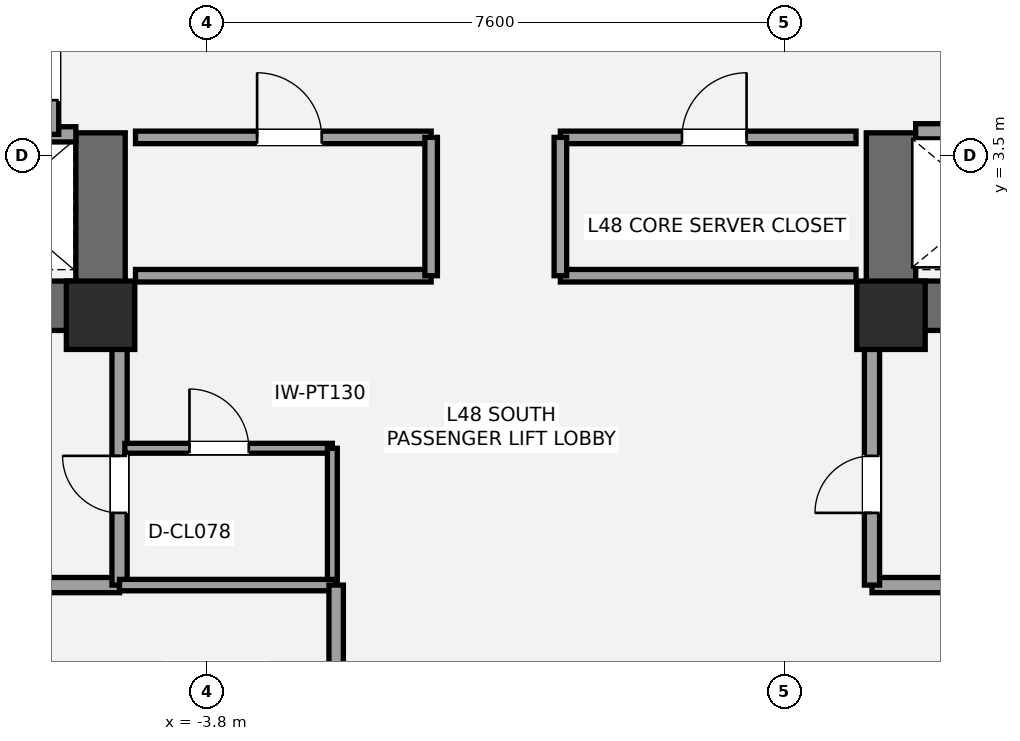
"""IFC4 building model, lengths in metres.
Left out: names, types, materials, properties, quantities, classifications, styles, units other than length and angle.
Written with IfcOpenShell. Run it as: python <this file> out.ifc"""

import sys

from ifc_helpers import new_model, si_unit, direction, frame, frame_2d, origin, origin_2d, place, context, subcontext, project, spatial, rectangle, extrude, element, fill, save


model = new_model("IFC4")
c1 = context("Model", 3, precision=1e-05, world=origin(), true_north=direction((0.0, 1.0)))
c2 = subcontext(c1, "Body", "Model", "MODEL_VIEW")
j1 = project(units=[si_unit("LENGTHUNIT", "METRE"), si_unit("PLANEANGLEUNIT", "RADIAN")], contexts=[c1])
p1 = place(None, origin())
s1 = spatial("IfcSite", under=j1, at=p1, CompositionType="ELEMENT")
p2 = place(p1, origin())
s2 = spatial("IfcBuilding", under=s1, at=p2, CompositionType="ELEMENT")
p3 = place(p2, frame((0.0, 0.0, 175.8)))
s3 = spatial("IfcBuildingStorey", under=s2, at=p3, CompositionType="ELEMENT", Elevation=175.8)
p4 = place(p3, frame((-4.875, 1.525, 0.0), z_axis=(0.0, 0.0, 1.0), x_axis=(-1.0, 0.0, 0.0)))
e1 = element("IfcWall", 1, at=p4, inside=s3, PredefinedType="SHEAR", context=c2, shape_type="SweptSolid", body=[
    extrude(rectangle(XDim=8.925, YDim=0.65, at=frame_2d((4.462, 0.0))), origin(), (0.0, 0.0, 1.0), 3.2),
])
p5 = place(p4, frame((5.425, 0.0, 0.0)))
e2 = element("IfcOpeningElement", 2, at=p5, cuts=e1, PredefinedType="OPENING", context=c2, shape_type="SweptSolid", body=[
    extrude(rectangle(XDim=1.05, YDim=2.15, at=frame_2d((0.525, 1.075))), frame((0.0, 0.335, 0.0), z_axis=(0.0, -1.0, 0.0), x_axis=(1.0, 0.0, 0.0)), (0.0, 0.0, 1.0), 0.67),
])
p6 = place(p4, frame((3.755, 0.0, 0.0)))
e3 = element("IfcOpeningElement", 3, at=p6, cuts=e1, PredefinedType="OPENING", context=c2, shape_type="SweptSolid", body=[
    extrude(rectangle(XDim=1.1, YDim=2.2, at=frame_2d((0.55, 1.1))), frame((0.0, 0.335, 0.0), z_axis=(0.0, -1.0, 0.0), x_axis=(1.0, 0.0, 0.0)), (0.0, 0.0, 1.0), 0.67),
])
p7 = place(p3, frame((-5.2, 1.2, 0.0), z_axis=(0.0, 0.0, 1.0), x_axis=(0.0, 1.0, 0.0)))
e4 = element("IfcWall", 4, at=p7, inside=s3, PredefinedType="SHEAR", context=c2, shape_type="SweptSolid", body=[
    extrude(rectangle(XDim=2.6, YDim=0.65, at=frame_2d((1.3, 0.0))), origin(), (0.0, 0.0, 1.0), 3.2),
])
p8 = place(p3, frame((13.8, 1.525, 0.0), z_axis=(0.0, 0.0, 1.0), x_axis=(-1.0, 0.0, 0.0)))
e5 = element("IfcWall", 5, at=p8, inside=s3, PredefinedType="SHEAR", context=c2, shape_type="SweptSolid", body=[
    extrude(rectangle(XDim=8.925, YDim=0.65, at=frame_2d((4.462, 0.0))), origin(), (0.0, 0.0, 1.0), 3.2),
])
p9 = place(p8, frame((2.45, 0.0, 0.0)))
e6 = element("IfcOpeningElement", 6, at=p9, cuts=e5, PredefinedType="OPENING", context=c2, shape_type="SweptSolid", body=[
    extrude(rectangle(XDim=1.05, YDim=2.15, at=frame_2d((0.525, 1.075))), frame((0.0, 0.335, 0.0), z_axis=(0.0, -1.0, 0.0), x_axis=(1.0, 0.0, 0.0)), (0.0, 0.0, 1.0), 0.67),
])
p10 = place(p8, frame((4.45, 0.0, 0.0)))
e7 = element("IfcOpeningElement", 7, at=p10, cuts=e5, PredefinedType="OPENING", context=c2, shape_type="SweptSolid", body=[
    extrude(rectangle(XDim=1.1, YDim=2.2, at=frame_2d((0.55, 1.1))), frame((0.0, 0.335, 0.0), z_axis=(0.0, -1.0, 0.0), x_axis=(1.0, 0.0, 0.0)), (0.0, 0.0, 1.0), 0.67),
])
p11 = place(p3, frame((5.2, 1.2, 0.0), z_axis=(0.0, 0.0, 1.0), x_axis=(0.0, 1.0, 0.0)))
e8 = element("IfcWall", 8, at=p11, inside=s3, PredefinedType="SHEAR", context=c2, shape_type="SweptSolid", body=[
    extrude(rectangle(XDim=2.6, YDim=0.65, at=frame_2d((1.3, 0.0))), origin(), (0.0, 0.0, 1.0), 3.2),
])
for number, where, z_axis, x_axis in (
    (9, (-5.2, 1.4, 0.0), (0.0, 0.0, 1.0), (1.0, 0.0, 0.0)),
    (10, (5.2, 1.4, 0.0), (0.0, 0.0, 1.0), (1.0, 0.0, 0.0)),
):
    element("IfcColumn", number, at=place(p3, frame(where, z_axis=z_axis, x_axis=x_axis)), inside=s3, PredefinedType="COLUMN", context=c2, shape_type="SweptSolid", body=[
        extrude(rectangle(XDim=0.9, YDim=0.9, at=origin_2d()), origin(), (0.0, 0.0, 1.0), 3.2),
    ])
p12 = place(p3, frame((-7.2, -2.15, 0.0), z_axis=(0.0, 0.0, 1.0), x_axis=(1.0, 0.0, 0.0)))
e11 = element("IfcWall", 11, at=p12, inside=s3, PredefinedType="SOLIDWALL", context=c2, shape_type="SweptSolid", body=[
    extrude(rectangle(XDim=2.25, YDim=0.2, at=frame_2d((1.125, 0.0))), origin(), (0.0, 0.0, 1.0), 3.02),
])
p13 = place(p3, frame((-4.95, -2.15, 0.0), z_axis=(0.0, 0.0, 1.0), x_axis=(0.0, 1.0, 0.0)))
e12 = element("IfcWall", 12, at=p13, inside=s3, PredefinedType="SOLIDWALL", context=c2, shape_type="SweptSolid", body=[
    extrude(rectangle(XDim=3.4, YDim=0.2, at=frame_2d((1.7, 0.0))), origin(), (0.0, 0.0, 1.0), 2.473),
])
p14 = place(p13, frame((0.95, 0.0, 0.0)))
e13 = element("IfcOpeningElement", 13, at=p14, cuts=e12, PredefinedType="OPENING", context=c2, shape_type="SweptSolid", body=[
    extrude(rectangle(XDim=0.75, YDim=2.1, at=frame_2d((0.375, 1.05))), frame((0.0, 0.11, 0.0), z_axis=(0.0, -1.0, 0.0), x_axis=(1.0, 0.0, 0.0)), (0.0, 0.0, 1.0), 0.22),
])
p15 = place(p3, frame((4.95, -2.15, 0.0), z_axis=(0.0, 0.0, 1.0), x_axis=(1.0, 0.0, 0.0)))
e14 = element("IfcWall", 14, at=p15, inside=s3, PredefinedType="SOLIDWALL", context=c2, shape_type="SweptSolid", body=[
    extrude(rectangle(XDim=2.25, YDim=0.2, at=frame_2d((1.125, 0.0))), origin(), (0.0, 0.0, 1.0), 3.02),
])
p16 = place(p3, frame((4.95, -2.15, 0.0), z_axis=(0.0, 0.0, 1.0), x_axis=(0.0, 1.0, 0.0)))
e15 = element("IfcWall", 15, at=p16, inside=s3, PredefinedType="SOLIDWALL", context=c2, shape_type="SweptSolid", body=[
    extrude(rectangle(XDim=3.4, YDim=0.2, at=frame_2d((1.7, 0.0))), origin(), (0.0, 0.0, 1.0), 2.473),
])
p17 = place(p16, frame((0.95, 0.0, 0.0)))
e16 = element("IfcOpeningElement", 16, at=p17, cuts=e15, PredefinedType="OPENING", context=c2, shape_type="SweptSolid", body=[
    extrude(rectangle(XDim=0.75, YDim=2.1, at=frame_2d((0.375, 1.05))), frame((0.0, 0.11, 0.0), z_axis=(0.0, -1.0, 0.0), x_axis=(1.0, 0.0, 0.0)), (0.0, 0.0, 1.0), 0.22),
])
p18 = place(p3, frame((-4.88, -0.35, 0.0), z_axis=(0.0, 0.0, 1.0), x_axis=(1.0, 0.0, 0.0)))
e17 = element("IfcWall", 17, at=p18, inside=s3, PredefinedType="PARTITIONING", context=c2, shape_type="SweptSolid", body=[
    extrude(rectangle(XDim=2.73, YDim=0.13, at=frame_2d((1.365, 0.0))), origin(), (0.0, 0.0, 1.0), 3.02),
])
p19 = place(p18, frame((0.85, 0.0, 0.0)))
e18 = element("IfcOpeningElement", 18, at=p19, cuts=e17, PredefinedType="OPENING", context=c2, shape_type="SweptSolid", body=[
    extrude(rectangle(XDim=0.78, YDim=2.1, at=frame_2d((0.39, 1.05))), frame((0.0, 0.075, 0.0), z_axis=(0.0, -1.0, 0.0), x_axis=(1.0, 0.0, 0.0)), (0.0, 0.0, 1.0), 0.15),
])
p20 = place(p3, frame((-2.15, -2.15, 0.0), z_axis=(0.0, 0.0, 1.0), x_axis=(0.0, 1.0, 0.0)))
e19 = element("IfcWall", 19, at=p20, inside=s3, PredefinedType="PARTITIONING", context=c2, shape_type="SweptSolid", body=[
    extrude(rectangle(XDim=1.8, YDim=0.13, at=frame_2d((0.9, 0.0))), origin(), (0.0, 0.0, 1.0), 3.02),
])
p21 = place(p3, frame((-9.78, 3.78, 0.0), z_axis=(0.0, 0.0, 1.0), x_axis=(1.0, 0.0, 0.0)))
e20 = element("IfcWall", 20, at=p21, inside=s3, PredefinedType="SOLIDWALL", context=c2, shape_type="SweptSolid", body=[
    extrude(rectangle(XDim=4.255, YDim=0.2, at=frame_2d((2.127, 0.0))), origin(), (0.0, 0.0, 1.0), 3.02),
])
p22 = place(p3, frame((-5.85, 3.78, 0.0), z_axis=(0.0, 0.0, 1.0), x_axis=(0.0, 1.0, 0.0)))
e21 = element("IfcWall", 21, at=p22, inside=s3, PredefinedType="SOLIDWALL", context=c2, shape_type="SweptSolid", body=[
    extrude(rectangle(XDim=1.69, YDim=0.2, at=frame_2d((0.845, 0.0))), origin(), (0.0, 0.0, 1.0), 3.02),
])
p23 = place(p22, frame((0.45, 0.0, 0.0)))
e22 = element("IfcOpeningElement", 22, at=p23, cuts=e21, PredefinedType="OPENING", context=c2, shape_type="SweptSolid", body=[
    extrude(rectangle(XDim=0.75, YDim=2.1, at=frame_2d((0.375, 1.05))), frame((0.0, 0.11, 0.0), z_axis=(0.0, -1.0, 0.0), x_axis=(1.0, 0.0, 0.0)), (0.0, 0.0, 1.0), 0.22),
])
p24 = place(p3, frame((5.525, 3.82, 0.0), z_axis=(0.0, 0.0, 1.0), x_axis=(1.0, 0.0, 0.0)))
e23 = element("IfcWall", 23, at=p24, inside=s3, PredefinedType="SOLIDWALL", context=c2, shape_type="SweptSolid", body=[
    extrude(rectangle(XDim=4.255, YDim=0.2, at=frame_2d((2.127, 0.0))), origin(), (0.0, 0.0, 1.0), 3.02),
])
p25 = place(p24, frame((0.65, 0.0, 0.0)))
e24 = element("IfcOpeningElement", 24, at=p25, cuts=e23, PredefinedType="OPENING", context=c2, shape_type="SweptSolid", body=[
    extrude(rectangle(XDim=1.2, YDim=2.2, at=frame_2d((0.6, 1.1))), frame((0.0, 0.11, 0.0), z_axis=(0.0, -1.0, 0.0), x_axis=(1.0, 0.0, 0.0)), (0.0, 0.0, 1.0), 0.22),
])
p26 = place(p3, frame((-4.74, 1.92, 0.0), z_axis=(0.0, 0.0, 1.0), x_axis=(1.0, 0.0, 0.0)))
e25 = element("IfcWall", 25, at=p26, inside=s3, PredefinedType="PARTITIONING", context=c2, shape_type="SweptSolid", body=[
    extrude(rectangle(XDim=3.89, YDim=0.165, at=frame_2d((1.945, 0.0))), origin(), (0.0, 0.0, 1.0), 2.16),
])
p27 = place(p3, frame((-4.74, 3.74, 0.0), z_axis=(0.0, 0.0, 1.0), x_axis=(1.0, 0.0, 0.0)))
e26 = element("IfcWall", 26, at=p27, inside=s3, PredefinedType="PARTITIONING", context=c2, shape_type="SweptSolid", body=[
    extrude(rectangle(XDim=3.89, YDim=0.165, at=frame_2d((1.945, 0.0))), origin(), (0.0, 0.0, 1.0), 3.02),
])
p28 = place(p27, frame((1.6, 0.0, 0.0)))
e27 = element("IfcOpeningElement", 27, at=p28, cuts=e26, PredefinedType="OPENING", context=c2, shape_type="SweptSolid", body=[
    extrude(rectangle(XDim=0.85, YDim=2.1, at=frame_2d((0.425, 1.05))), frame((0.0, 0.093, 0.0), z_axis=(0.0, -1.0, 0.0), x_axis=(1.0, 0.0, 0.0)), (0.0, 0.0, 1.0), 0.185),
])
p29 = place(p3, frame((-0.85, 1.92, 0.0), z_axis=(0.0, 0.0, 1.0), x_axis=(0.0, 1.0, 0.0)))
e28 = element("IfcWall", 28, at=p29, inside=s3, PredefinedType="PARTITIONING", context=c2, shape_type="SweptSolid", body=[
    extrude(rectangle(XDim=1.82, YDim=0.165, at=frame_2d((0.91, 0.0))), origin(), (0.0, 0.0, 1.0), 3.02),
])
p30 = place(p3, frame((0.85, 1.92, 0.0), z_axis=(0.0, 0.0, 1.0), x_axis=(1.0, 0.0, 0.0)))
e29 = element("IfcWall", 29, at=p30, inside=s3, PredefinedType="PARTITIONING", context=c2, shape_type="SweptSolid", body=[
    extrude(rectangle(XDim=3.89, YDim=0.165, at=frame_2d((1.945, 0.0))), origin(), (0.0, 0.0, 1.0), 2.16),
])
p31 = place(p3, frame((0.85, 3.74, 0.0), z_axis=(0.0, 0.0, 1.0), x_axis=(1.0, 0.0, 0.0)))
e30 = element("IfcWall", 30, at=p31, inside=s3, PredefinedType="PARTITIONING", context=c2, shape_type="SweptSolid", body=[
    extrude(rectangle(XDim=3.89, YDim=0.165, at=frame_2d((1.945, 0.0))), origin(), (0.0, 0.0, 1.0), 3.02),
])
p32 = place(p31, frame((1.6, 0.0, 0.0)))
e31 = element("IfcOpeningElement", 31, at=p32, cuts=e30, PredefinedType="OPENING", context=c2, shape_type="SweptSolid", body=[
    extrude(rectangle(XDim=0.85, YDim=2.1, at=frame_2d((0.425, 1.05))), frame((0.0, 0.093, 0.0), z_axis=(0.0, -1.0, 0.0), x_axis=(1.0, 0.0, 0.0)), (0.0, 0.0, 1.0), 0.185),
])
p33 = place(p3, frame((0.85, 1.92, 0.0), z_axis=(0.0, 0.0, 1.0), x_axis=(0.0, 1.0, 0.0)))
e32 = element("IfcWall", 32, at=p33, inside=s3, PredefinedType="PARTITIONING", context=c2, shape_type="SweptSolid", body=[
    extrude(rectangle(XDim=1.82, YDim=0.165, at=frame_2d((0.91, 0.0))), origin(), (0.0, 0.0, 1.0), 3.02),
])
p34 = place(p3, frame((-4.95, -2.15, 0.0), z_axis=(0.0, 0.0, 1.0), x_axis=(1.0, 0.0, 0.0)))
e33 = element("IfcWall", 33, at=p34, inside=s3, PredefinedType="PLUMBINGWALL", context=c2, shape_type="SweptSolid", body=[
    extrude(rectangle(XDim=2.85, YDim=0.15, at=frame_2d((1.425, 0.0))), origin(), (0.0, 0.0, 1.0), 3.02),
])
p35 = place(p3, frame((-2.1, -4.05, 0.0), z_axis=(0.0, 0.0, 1.0), x_axis=(0.0, 1.0, 0.0)))
e34 = element("IfcWall", 34, at=p35, inside=s3, PredefinedType="PLUMBINGWALL", context=c2, shape_type="SweptSolid", body=[
    extrude(rectangle(XDim=1.9, YDim=0.19, at=frame_2d((0.95, 0.0))), origin(), (0.0, 0.0, 1.0), 3.02),
])
p36 = place(p14, origin())
e35 = element("IfcDoor", 35, at=p36, inside=s3, OperationType="SINGLE_SWING_RIGHT", PredefinedType="DOOR", context=c2, shape_type="SweptSolid", body=[
    extrude(rectangle(XDim=0.75, YDim=2.1, at=frame_2d((0.375, 1.05))), frame((0.0, 0.025, 0.0), z_axis=(0.0, -1.0, 0.0), x_axis=(1.0, 0.0, 0.0)), (0.0, 0.0, 1.0), 0.05),
])
fill(e13, e35)
p37 = place(p17, origin())
e36 = element("IfcDoor", 36, at=p37, inside=s3, OperationType="SINGLE_SWING_LEFT", PredefinedType="DOOR", context=c2, shape_type="SweptSolid", body=[
    extrude(rectangle(XDim=0.75, YDim=2.1, at=frame_2d((0.375, 1.05))), frame((0.0, 0.025, 0.0), z_axis=(0.0, -1.0, 0.0), x_axis=(1.0, 0.0, 0.0)), (0.0, 0.0, 1.0), 0.05),
])
fill(e16, e36)
p38 = place(p19, origin())
e37 = element("IfcDoor", 37, at=p38, inside=s3, OperationType="SINGLE_SWING_LEFT", PredefinedType="DOOR", context=c2, shape_type="SweptSolid", body=[
    extrude(rectangle(XDim=0.78, YDim=2.1, at=frame_2d((0.39, 1.05))), frame((0.0, 0.025, 0.0), z_axis=(0.0, -1.0, 0.0), x_axis=(1.0, 0.0, 0.0)), (0.0, 0.0, 1.0), 0.05),
])
fill(e18, e37)
p39 = place(p23, origin())
e38 = element("IfcDoor", 38, at=p39, inside=s3, OperationType="SINGLE_SWING_RIGHT", PredefinedType="DOOR", context=c2, shape_type="SweptSolid", body=[
    extrude(rectangle(XDim=0.75, YDim=2.1, at=frame_2d((0.375, 1.05))), frame((0.0, 0.025, 0.0), z_axis=(0.0, -1.0, 0.0), x_axis=(1.0, 0.0, 0.0)), (0.0, 0.0, 1.0), 0.05),
])
fill(e22, e38)
p40 = place(p28, origin())
e39 = element("IfcDoor", 39, at=p40, inside=s3, OperationType="SINGLE_SWING_LEFT", PredefinedType="DOOR", context=c2, shape_type="SweptSolid", body=[
    extrude(rectangle(XDim=0.85, YDim=2.1, at=frame_2d((0.425, 1.05))), frame((0.0, 0.025, 0.0), z_axis=(0.0, -1.0, 0.0), x_axis=(1.0, 0.0, 0.0)), (0.0, 0.0, 1.0), 0.05),
])
fill(e27, e39)
p41 = place(p32, origin())
e40 = element("IfcDoor", 40, at=p41, inside=s3, OperationType="SINGLE_SWING_RIGHT", PredefinedType="DOOR", context=c2, shape_type="SweptSolid", body=[
    extrude(rectangle(XDim=0.85, YDim=2.1, at=frame_2d((0.425, 1.05))), frame((0.0, 0.025, 0.0), z_axis=(0.0, -1.0, 0.0), x_axis=(1.0, 0.0, 0.0)), (0.0, 0.0, 1.0), 0.05),
])
fill(e31, e40)
save(model, sys.argv[1])
